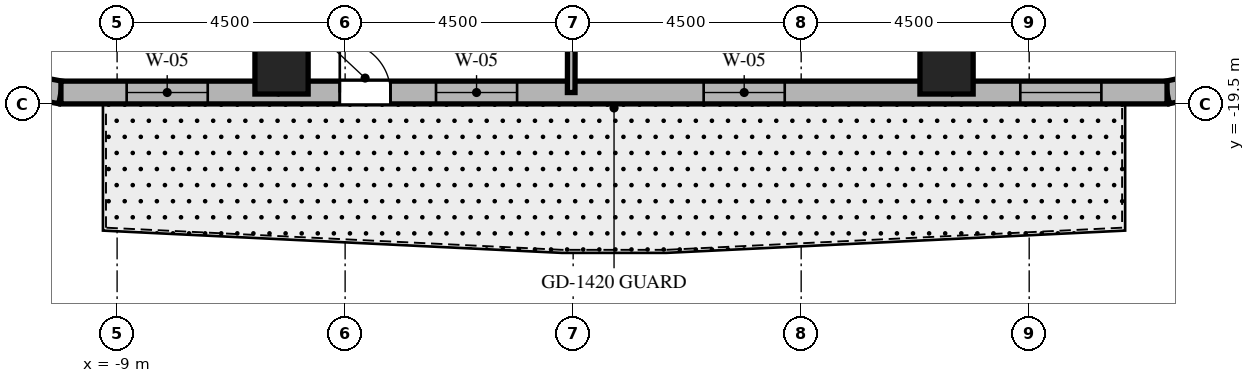
"""IFC4 building model, lengths in metres.
Left out: names, types, materials, properties, quantities, classifications, styles, units other than length and angle.
Written with IfcOpenShell. Run it as: python <this file> out.ifc"""

import sys

from ifc_helpers import new_model, si_unit, direction, frame, frame_2d, origin, origin_2d, place, context, subcontext, project, spatial, rectangle, extrude, element, fill, save


model = new_model("IFC4")
c1 = context("Model", 3, precision=1e-05, world=origin(), true_north=direction((0.0, 1.0)))
c2 = subcontext(c1, "Body", "Model", "MODEL_VIEW")
j1 = project(units=[si_unit("LENGTHUNIT", "METRE"), si_unit("PLANEANGLEUNIT", "RADIAN")], contexts=[c1])
p1 = place(None, origin())
s1 = spatial("IfcSite", under=j1, at=p1, CompositionType="ELEMENT")
p2 = place(p1, origin())
s2 = spatial("IfcBuilding", under=s1, at=p2, CompositionType="ELEMENT")
p3 = place(p2, frame((0.0, 0.0, 159.1)))
s3 = spatial("IfcBuildingStorey", under=s2, at=p3, CompositionType="ELEMENT", Elevation=159.1)
for number, where, z_axis, x_axis in (
    (1, (-5.755, -18.78, 0.0), (0.0, 0.0, 1.0), (1.0, 0.0, 0.0)),
    (2, (7.369, -18.78, 0.0), (0.0, 0.0, 1.0), (1.0, 0.0, 0.0)),
):
    element("IfcColumn", number, at=place(p3, frame(where, z_axis=z_axis, x_axis=x_axis)), inside=s3, PredefinedType="COLUMN", context=c2, shape_type="SweptSolid", body=[
        extrude(rectangle(XDim=1.05, YDim=1.05, at=origin_2d()), origin(), (0.0, 0.0, 1.0), 3.7),
    ])
p4 = place(p3, frame((-11.349, -19.043, 0.0), z_axis=(0.0, 0.0, 1.0), x_axis=(0.982931267051, -0.183973161772, 0.0)))
e3 = element("IfcWall", 3, at=p4, inside=s3, PredefinedType="SOLIDWALL", context=c2, shape_type="SweptSolid", body=[
    extrude(rectangle(XDim=1.262, YDim=0.45, at=frame_2d((0.631, 0.0))), origin(), (0.0, 0.0, 1.0), 3.4),
])
p5 = place(p3, frame((11.72, -19.275, 0.0), z_axis=(0.0, 0.0, 1.0), x_axis=(0.97893106758, 0.204191001093, 0.0)))
e4 = element("IfcWall", 4, at=p5, inside=s3, PredefinedType="SOLIDWALL", context=c2, shape_type="SweptSolid", body=[
    extrude(rectangle(XDim=1.4, YDim=0.45, at=frame_2d((0.7, 0.0))), origin(), (0.0, 0.0, 1.0), 3.4),
])
p6 = place(p3, frame((-10.108, -19.275, 0.0), z_axis=(0.0, 0.0, 1.0), x_axis=(1.0, 0.0, 0.0)))
e5 = element("IfcWall", 5, at=p6, inside=s3, PredefinedType="SOLIDWALL", context=c2, shape_type="SweptSolid", body=[
    extrude(rectangle(XDim=21.829, YDim=0.45, at=frame_2d((10.915, 0.0))), origin(), (0.0, 0.0, 1.0), 3.4),
])
p7 = place(p6, frame((5.503, 0.0, 0.0)))
e6 = element("IfcOpeningElement", 6, at=p7, cuts=e5, PredefinedType="OPENING", context=c2, shape_type="SweptSolid", body=[
    extrude(rectangle(XDim=1.0, YDim=2.15, at=frame_2d((0.5, 1.075))), frame((0.0, 0.235, 0.0), z_axis=(0.0, -1.0, 0.0), x_axis=(1.0, 0.0, 0.0)), (0.0, 0.0, 1.0), 0.47),
])
p8 = place(p6, frame((1.297, 0.0, 0.8)))
e7 = element("IfcOpeningElement", 7, at=p8, cuts=e5, PredefinedType="OPENING", context=c2, shape_type="SweptSolid", body=[
    extrude(rectangle(XDim=1.6, YDim=1.75, at=frame_2d((0.8, 0.875))), frame((0.0, 0.235, 0.0), z_axis=(0.0, -1.0, 0.0), x_axis=(1.0, 0.0, 0.0)), (0.0, 0.0, 1.0), 0.47),
])
p9 = place(p6, frame((7.402, 0.0, 0.8)))
e8 = element("IfcOpeningElement", 8, at=p9, cuts=e5, PredefinedType="OPENING", context=c2, shape_type="SweptSolid", body=[
    extrude(rectangle(XDim=1.6, YDim=1.75, at=frame_2d((0.8, 0.875))), frame((0.0, 0.235, 0.0), z_axis=(0.0, -1.0, 0.0), x_axis=(1.0, 0.0, 0.0)), (0.0, 0.0, 1.0), 0.47),
])
p10 = place(p6, frame((12.684, 0.0, 0.8)))
e9 = element("IfcOpeningElement", 9, at=p10, cuts=e5, PredefinedType="OPENING", context=c2, shape_type="SweptSolid", body=[
    extrude(rectangle(XDim=1.6, YDim=1.75, at=frame_2d((0.8, 0.875))), frame((0.0, 0.235, 0.0), z_axis=(0.0, -1.0, 0.0), x_axis=(1.0, 0.0, 0.0)), (0.0, 0.0, 1.0), 0.47),
])
p11 = place(p6, frame((18.933, 0.0, 0.8)))
e10 = element("IfcOpeningElement", 10, at=p11, cuts=e5, PredefinedType="OPENING", context=c2, shape_type="SweptSolid", body=[
    extrude(rectangle(XDim=1.6, YDim=1.75, at=frame_2d((0.8, 0.875))), frame((0.0, 0.235, 0.0), z_axis=(0.0, -1.0, 0.0), x_axis=(1.0, 0.0, 0.0)), (0.0, 0.0, 1.0), 0.47),
])
p12 = place(p3, frame((-3.631, -11.85, 0.0), z_axis=(0.0, 0.0, 1.0), x_axis=(-0.293007573338, -0.956110120209, 0.0)))
e11 = element("IfcWall", 11, at=p12, inside=s3, PredefinedType="PARTITIONING", context=c2, shape_type="SweptSolid", body=[
    extrude(rectangle(XDim=7.766, YDim=0.15, at=frame_2d((3.883, 0.0))), origin(), (0.0, 0.0, 1.0), 2.64),
])
p13 = place(p3, frame((-0.024, -11.85, 0.0), z_axis=(0.0, 0.0, 1.0), x_axis=(-0.001972901592, -0.999998053828, 0.0)))
e12 = element("IfcWall", 12, at=p13, inside=s3, PredefinedType="PARTITIONING", context=c2, shape_type="SweptSolid", body=[
    extrude(rectangle(XDim=7.425, YDim=0.15, at=frame_2d((3.712, 0.0))), origin(), (0.0, 0.0, 1.0), 2.64),
])
p14 = place(p3, frame((4.65, -11.85, 0.0), z_axis=(0.0, 0.0, 1.0), x_axis=(0.365265947993, -0.930903210456, 0.0)))
e13 = element("IfcWall", 13, at=p14, inside=s3, PredefinedType="PARTITIONING", context=c2, shape_type="SweptSolid", body=[
    extrude(rectangle(XDim=7.976, YDim=0.15, at=frame_2d((3.988, 0.0))), origin(), (0.0, 0.0, 1.0), 2.64),
])
p15 = place(p3, frame((8.39, -11.85, 0.0), z_axis=(0.0, 0.0, 1.0), x_axis=(0.577877530264, -0.816123495566, 0.0)))
e14 = element("IfcWall", 14, at=p15, inside=s3, PredefinedType="PARTITIONING", context=c2, shape_type="SweptSolid", body=[
    extrude(rectangle(XDim=8.382, YDim=0.15, at=frame_2d((4.191, 0.0))), origin(), (0.0, 0.0, 1.0), 2.64),
])
p16 = place(p7, origin())
e15 = element("IfcDoor", 15, at=p16, inside=s3, OperationType="SINGLE_SWING_LEFT", PredefinedType="DOOR", context=c2, shape_type="SweptSolid", body=[
    extrude(rectangle(XDim=1.0, YDim=2.15, at=frame_2d((0.5, 1.075))), frame((0.0, 0.025, 0.0), z_axis=(0.0, -1.0, 0.0), x_axis=(1.0, 0.0, 0.0)), (0.0, 0.0, 1.0), 0.05),
])
fill(e6, e15)
p17 = place(p8, origin())
e16 = element("IfcWindow", 16, at=p17, inside=s3, PartitioningType="SINGLE_PANEL", PredefinedType="WINDOW", context=c2, shape_type="SweptSolid", body=[
    extrude(rectangle(XDim=1.6, YDim=1.75, at=frame_2d((0.8, 0.875))), frame((0.0, 0.03, 0.0), z_axis=(0.0, -1.0, 0.0), x_axis=(1.0, 0.0, 0.0)), (0.0, 0.0, 1.0), 0.06),
])
fill(e7, e16)
p18 = place(p9, origin())
e17 = element("IfcWindow", 17, at=p18, inside=s3, PartitioningType="SINGLE_PANEL", PredefinedType="WINDOW", context=c2, shape_type="SweptSolid", body=[
    extrude(rectangle(XDim=1.6, YDim=1.75, at=frame_2d((0.8, 0.875))), frame((0.0, 0.03, 0.0), z_axis=(0.0, -1.0, 0.0), x_axis=(1.0, 0.0, 0.0)), (0.0, 0.0, 1.0), 0.06),
])
fill(e8, e17)
p19 = place(p10, origin())
e18 = element("IfcWindow", 18, at=p19, inside=s3, PartitioningType="SINGLE_PANEL", PredefinedType="WINDOW", context=c2, shape_type="SweptSolid", body=[
    extrude(rectangle(XDim=1.6, YDim=1.75, at=frame_2d((0.8, 0.875))), frame((0.0, 0.03, 0.0), z_axis=(0.0, -1.0, 0.0), x_axis=(1.0, 0.0, 0.0)), (0.0, 0.0, 1.0), 0.06),
])
fill(e9, e18)
p20 = place(p11, origin())
e19 = element("IfcWindow", 19, at=p20, inside=s3, PartitioningType="SINGLE_PANEL", PredefinedType="WINDOW", context=c2, shape_type="SweptSolid", body=[
    extrude(rectangle(XDim=1.6, YDim=1.75, at=frame_2d((0.8, 0.875))), frame((0.0, 0.03, 0.0), z_axis=(0.0, -1.0, 0.0), x_axis=(1.0, 0.0, 0.0)), (0.0, 0.0, 1.0), 0.06),
])
fill(e10, e19)
save(model, sys.argv[1])
